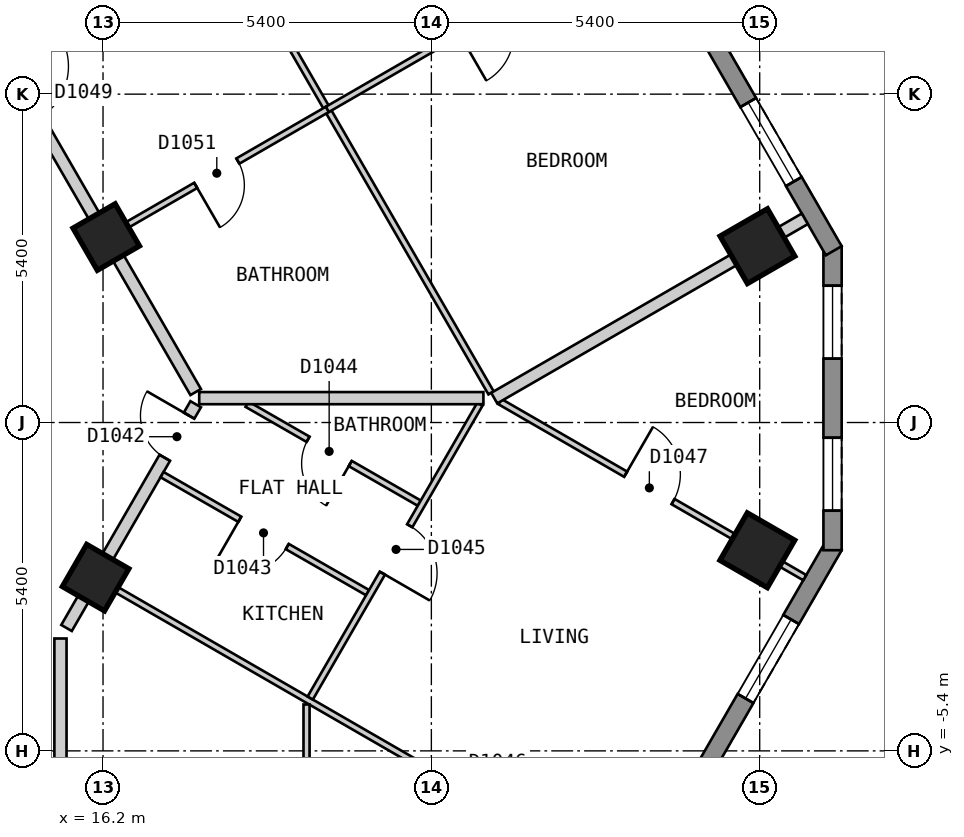
"""IFC4 building model, lengths in metres.
Left out: names, types, materials, properties, quantities, classifications, styles, units other than length and angle.
Written with IfcOpenShell. Run it as: python <this file> out.ifc"""

import sys

from ifc_helpers import new_model, si_unit, direction, frame, frame_2d, origin, origin_2d, place, context, subcontext, project, spatial, polyline, rectangle, outline, extrude, element, fill, save


model = new_model("IFC4")
c1 = context("Model", 3, precision=1e-05, world=origin(), true_north=direction((0.0, 1.0)))
c2 = subcontext(c1, "Body", "Model", "MODEL_VIEW")
j1 = project(units=[si_unit("LENGTHUNIT", "METRE"), si_unit("PLANEANGLEUNIT", "RADIAN")], contexts=[c1])
p1 = place(None, origin())
s1 = spatial("IfcSite", under=j1, at=p1, CompositionType="ELEMENT")
p2 = place(p1, origin())
s2 = spatial("IfcBuilding", under=s1, at=p2, CompositionType="ELEMENT")
p3 = place(p2, frame((0.0, 0.0, 120.6)))
s3 = spatial("IfcBuildingStorey", under=s2, at=p3, CompositionType="ELEMENT", Elevation=120.6)
for number, where, z_axis, x_axis in (
    (1, (26.961, -2.101, 0.0), (0.0, 0.0, 1.0), (0.5, 0.866, 0.0)),
    (2, (26.963, 2.9, 0.0), (0.0, 0.0, 1.0), (-0.5, 0.866, 0.0)),
):
    element("IfcColumn", number, at=place(p3, frame(where, z_axis=z_axis, x_axis=x_axis)), inside=s3, PredefinedType="COLUMN", context=c2, shape_type="SweptSolid", body=[
        extrude(rectangle(XDim=0.9, YDim=0.9, at=origin_2d()), origin(), (0.0, 0.0, 1.0), 3.0),
    ])
for number, where, z_axis, x_axis in (
    (3, (16.078, -2.551, 0.0), (0.0, 0.0, 1.0), (0.5, 0.866, 0.0)),
    (4, (16.253, 3.05, 0.0), (0.0, 0.0, 1.0), (-0.5, 0.866, 0.0)),
):
    element("IfcColumn", number, at=place(p3, frame(where, z_axis=z_axis, x_axis=x_axis)), inside=s3, PredefinedType="COLUMN", context=c2, shape_type="SweptSolid", body=[
        extrude(rectangle(XDim=0.8, YDim=0.8, at=origin_2d()), origin(), (0.0, 0.0, 1.0), 3.0),
    ])
p4 = place(p3, frame((15.862, -23.425, 0.0), z_axis=(0.0, 0.0, 1.0), x_axis=(0.500017503135, 0.866015298109, 0.0)))
e5 = element("IfcWall", 5, at=p4, inside=s3, PredefinedType="SOLIDWALL", context=c2, shape_type="SweptSolid", body=[
    extrude(outline(polyline([(0.0, -0.15), (24.711, -0.15), (24.631, 0.15), (0.08, 0.15), (0.0, -0.15)])), origin(), (0.0, 0.0, 1.0), 2.7),
])
p5 = place(p4, frame((1.4, 0.0, 0.15)))
e6 = element("IfcOpeningElement", 6, at=p5, cuts=e5, PredefinedType="OPENING", context=c2, shape_type="SweptSolid", body=[
    extrude(rectangle(XDim=1.5, YDim=2.1, at=frame_2d((0.75, 1.05))), frame((0.0, 0.16, 0.0), z_axis=(0.0, -1.0, 0.0), x_axis=(1.0, 0.0, 0.0)), (0.0, 0.0, 1.0), 0.32),
])
p6 = place(p4, frame((4.316, 0.0, 0.15)))
e7 = element("IfcOpeningElement", 7, at=p6, cuts=e5, PredefinedType="OPENING", context=c2, shape_type="SweptSolid", body=[
    extrude(rectangle(XDim=1.5, YDim=2.1, at=frame_2d((0.75, 1.05))), frame((0.0, 0.16, 0.0), z_axis=(0.0, -1.0, 0.0), x_axis=(1.0, 0.0, 0.0)), (0.0, 0.0, 1.0), 0.32),
])
p7 = place(p4, frame((7.231, 0.0, 0.15)))
e8 = element("IfcOpeningElement", 8, at=p7, cuts=e5, PredefinedType="OPENING", context=c2, shape_type="SweptSolid", body=[
    extrude(rectangle(XDim=1.5, YDim=2.1, at=frame_2d((0.75, 1.05))), frame((0.0, 0.16, 0.0), z_axis=(0.0, -1.0, 0.0), x_axis=(1.0, 0.0, 0.0)), (0.0, 0.0, 1.0), 0.32),
])
p8 = place(p4, frame((10.147, 0.0, 0.15)))
e9 = element("IfcOpeningElement", 9, at=p8, cuts=e5, PredefinedType="OPENING", context=c2, shape_type="SweptSolid", body=[
    extrude(rectangle(XDim=1.5, YDim=2.1, at=frame_2d((0.75, 1.05))), frame((0.0, 0.16, 0.0), z_axis=(0.0, -1.0, 0.0), x_axis=(1.0, 0.0, 0.0)), (0.0, 0.0, 1.0), 0.32),
])
p9 = place(p4, frame((13.062, 0.0, 0.15)))
e10 = element("IfcOpeningElement", 10, at=p9, cuts=e5, PredefinedType="OPENING", context=c2, shape_type="SweptSolid", body=[
    extrude(rectangle(XDim=1.5, YDim=2.1, at=frame_2d((0.75, 1.05))), frame((0.0, 0.16, 0.0), z_axis=(0.0, -1.0, 0.0), x_axis=(1.0, 0.0, 0.0)), (0.0, 0.0, 1.0), 0.32),
])
p10 = place(p4, frame((15.977, 0.0, 0.15)))
e11 = element("IfcOpeningElement", 11, at=p10, cuts=e5, PredefinedType="OPENING", context=c2, shape_type="SweptSolid", body=[
    extrude(rectangle(XDim=1.5, YDim=2.1, at=frame_2d((0.75, 1.05))), frame((0.0, 0.16, 0.0), z_axis=(0.0, -1.0, 0.0), x_axis=(1.0, 0.0, 0.0)), (0.0, 0.0, 1.0), 0.32),
])
p11 = place(p4, frame((18.893, 0.0, 0.15)))
e12 = element("IfcOpeningElement", 12, at=p11, cuts=e5, PredefinedType="OPENING", context=c2, shape_type="SweptSolid", body=[
    extrude(rectangle(XDim=1.5, YDim=2.1, at=frame_2d((0.75, 1.05))), frame((0.0, 0.16, 0.0), z_axis=(0.0, -1.0, 0.0), x_axis=(1.0, 0.0, 0.0)), (0.0, 0.0, 1.0), 0.32),
])
p12 = place(p4, frame((21.809, 0.0, 0.15)))
e13 = element("IfcOpeningElement", 13, at=p12, cuts=e5, PredefinedType="OPENING", context=c2, shape_type="SweptSolid", body=[
    extrude(rectangle(XDim=1.5, YDim=2.1, at=frame_2d((0.75, 1.05))), frame((0.0, 0.16, 0.0), z_axis=(0.0, -1.0, 0.0), x_axis=(1.0, 0.0, 0.0)), (0.0, 0.0, 1.0), 0.32),
])
p13 = place(p3, frame((28.198, -2.1, 0.0), z_axis=(0.0, 0.0, 1.0), x_axis=(0.0, 1.0, 0.0)))
e14 = element("IfcWall", 14, at=p13, inside=s3, PredefinedType="SOLIDWALL", context=c2, shape_type="SweptSolid", body=[
    extrude(outline(polyline([(0.0, -0.15), (5.0, -0.15), (4.92, 0.15), (0.08, 0.15), (0.0, -0.15)])), origin(), (0.0, 0.0, 1.0), 2.7),
])
p14 = place(p13, frame((0.65, 0.0, 0.15)))
e15 = element("IfcOpeningElement", 15, at=p14, cuts=e14, PredefinedType="OPENING", context=c2, shape_type="SweptSolid", body=[
    extrude(rectangle(XDim=1.2, YDim=2.1, at=frame_2d((0.6, 1.05))), frame((0.0, 0.16, 0.0), z_axis=(0.0, -1.0, 0.0), x_axis=(1.0, 0.0, 0.0)), (0.0, 0.0, 1.0), 0.32),
])
p15 = place(p13, frame((3.15, 0.0, 0.15)))
e16 = element("IfcOpeningElement", 16, at=p15, cuts=e14, PredefinedType="OPENING", context=c2, shape_type="SweptSolid", body=[
    extrude(rectangle(XDim=1.2, YDim=2.1, at=frame_2d((0.6, 1.05))), frame((0.0, 0.16, 0.0), z_axis=(0.0, -1.0, 0.0), x_axis=(1.0, 0.0, 0.0)), (0.0, 0.0, 1.0), 0.32),
])
p16 = place(p3, frame((28.218, 2.825, 0.0), z_axis=(0.0, 0.0, 1.0), x_axis=(-0.500020536353, 0.866013546791, 0.0)))
e17 = element("IfcWall", 17, at=p16, inside=s3, PredefinedType="SOLIDWALL", context=c2, shape_type="SweptSolid", body=[
    extrude(outline(polyline([(0.0, -0.15), (23.325, -0.15), (23.245, 0.15), (0.08, 0.15), (0.0, -0.15)])), origin(), (0.0, 0.0, 1.0), 2.7),
])
p17 = place(p16, frame((1.314, 0.0, 0.15)))
e18 = element("IfcOpeningElement", 18, at=p17, cuts=e17, PredefinedType="OPENING", context=c2, shape_type="SweptSolid", body=[
    extrude(rectangle(XDim=1.5, YDim=2.1, at=frame_2d((0.75, 1.05))), frame((0.0, 0.16, 0.0), z_axis=(0.0, -1.0, 0.0), x_axis=(1.0, 0.0, 0.0)), (0.0, 0.0, 1.0), 0.32),
])
p18 = place(p16, frame((4.056, 0.0, 0.15)))
e19 = element("IfcOpeningElement", 19, at=p18, cuts=e17, PredefinedType="OPENING", context=c2, shape_type="SweptSolid", body=[
    extrude(rectangle(XDim=1.5, YDim=2.1, at=frame_2d((0.75, 1.05))), frame((0.0, 0.16, 0.0), z_axis=(0.0, -1.0, 0.0), x_axis=(1.0, 0.0, 0.0)), (0.0, 0.0, 1.0), 0.32),
])
p19 = place(p16, frame((6.798, 0.0, 0.15)))
e20 = element("IfcOpeningElement", 20, at=p19, cuts=e17, PredefinedType="OPENING", context=c2, shape_type="SweptSolid", body=[
    extrude(rectangle(XDim=1.5, YDim=2.1, at=frame_2d((0.75, 1.05))), frame((0.0, 0.16, 0.0), z_axis=(0.0, -1.0, 0.0), x_axis=(1.0, 0.0, 0.0)), (0.0, 0.0, 1.0), 0.32),
])
p20 = place(p16, frame((9.541, 0.0, 0.15)))
e21 = element("IfcOpeningElement", 21, at=p20, cuts=e17, PredefinedType="OPENING", context=c2, shape_type="SweptSolid", body=[
    extrude(rectangle(XDim=1.5, YDim=2.1, at=frame_2d((0.75, 1.05))), frame((0.0, 0.16, 0.0), z_axis=(0.0, -1.0, 0.0), x_axis=(1.0, 0.0, 0.0)), (0.0, 0.0, 1.0), 0.32),
])
p21 = place(p16, frame((12.284, 0.0, 0.15)))
e22 = element("IfcOpeningElement", 22, at=p21, cuts=e17, PredefinedType="OPENING", context=c2, shape_type="SweptSolid", body=[
    extrude(rectangle(XDim=1.5, YDim=2.1, at=frame_2d((0.75, 1.05))), frame((0.0, 0.16, 0.0), z_axis=(0.0, -1.0, 0.0), x_axis=(1.0, 0.0, 0.0)), (0.0, 0.0, 1.0), 0.32),
])
p22 = place(p16, frame((15.027, 0.0, 0.15)))
e23 = element("IfcOpeningElement", 23, at=p22, cuts=e17, PredefinedType="OPENING", context=c2, shape_type="SweptSolid", body=[
    extrude(rectangle(XDim=1.5, YDim=2.1, at=frame_2d((0.75, 1.05))), frame((0.0, 0.16, 0.0), z_axis=(0.0, -1.0, 0.0), x_axis=(1.0, 0.0, 0.0)), (0.0, 0.0, 1.0), 0.32),
])
p23 = place(p16, frame((17.769, 0.0, 0.15)))
e24 = element("IfcOpeningElement", 24, at=p23, cuts=e17, PredefinedType="OPENING", context=c2, shape_type="SweptSolid", body=[
    extrude(rectangle(XDim=1.5, YDim=2.1, at=frame_2d((0.75, 1.05))), frame((0.0, 0.16, 0.0), z_axis=(0.0, -1.0, 0.0), x_axis=(1.0, 0.0, 0.0)), (0.0, 0.0, 1.0), 0.32),
])
p24 = place(p16, frame((20.511, 0.0, 0.15)))
e25 = element("IfcOpeningElement", 25, at=p24, cuts=e17, PredefinedType="OPENING", context=c2, shape_type="SweptSolid", body=[
    extrude(rectangle(XDim=1.5, YDim=2.1, at=frame_2d((0.75, 1.05))), frame((0.0, 0.16, 0.0), z_axis=(0.0, -1.0, 0.0), x_axis=(1.0, 0.0, 0.0)), (0.0, 0.0, 1.0), 0.32),
])
p25 = place(p3, frame((9.296, 15.1, 0.0), z_axis=(0.0, 0.0, 1.0), x_axis=(0.499974024244, -0.866040400375, 0.0)))
e26 = element("IfcWall", 26, at=p25, inside=s3, PredefinedType="PARTITIONING", context=c2, shape_type="SweptSolid", body=[
    extrude(rectangle(XDim=16.857, YDim=0.2, at=frame_2d((8.429, 0.0))), origin(), (0.0, 0.0, 1.0), 2.7),
])
p26 = place(p25, frame((10.672, 0.0, 0.0)))
e27 = element("IfcOpeningElement", 27, at=p26, cuts=e26, PredefinedType="OPENING", context=c2, shape_type="SweptSolid", body=[
    extrude(rectangle(XDim=1.0, YDim=2.1, at=frame_2d((0.5, 1.05))), frame((0.0, 0.11, 0.0), z_axis=(0.0, -1.0, 0.0), x_axis=(1.0, 0.0, 0.0)), (0.0, 0.0, 1.0), 0.22),
])
p27 = place(p3, frame((15.6, -3.379, 0.0), z_axis=(0.0, 0.0, 1.0), x_axis=(0.499896543382, 0.866085126252, 0.0)))
e28 = element("IfcWall", 28, at=p27, inside=s3, PredefinedType="PARTITIONING", context=c2, shape_type="SweptSolid", body=[
    extrude(rectangle(XDim=4.249, YDim=0.2, at=frame_2d((2.125, 0.0))), origin(), (0.0, 0.0, 1.0), 2.7),
])
p28 = place(p27, frame((3.232, 0.0, 0.0)))
e29 = element("IfcOpeningElement", 29, at=p28, cuts=e28, PredefinedType="OPENING", context=c2, shape_type="SweptSolid", body=[
    extrude(rectangle(XDim=0.8, YDim=2.1, at=frame_2d((0.4, 1.05))), frame((0.0, 0.11, 0.0), z_axis=(0.0, -1.0, 0.0), x_axis=(1.0, 0.0, 0.0)), (0.0, 0.0, 1.0), 0.22),
])
p29 = place(p3, frame((15.5, -21.2, 0.0), z_axis=(0.0, 0.0, 1.0), x_axis=(0.0, 1.0, 0.0)))
e30 = element("IfcWall", 30, at=p29, inside=s3, PredefinedType="PARTITIONING", context=c2, shape_type="SweptSolid", body=[
    extrude(rectangle(XDim=17.648, YDim=0.2, at=frame_2d((8.824, 0.0))), origin(), (0.0, 0.0, 1.0), 2.7),
])
p30 = place(p29, frame((7.575, 0.0, 0.0)))
e31 = element("IfcOpeningElement", 31, at=p30, cuts=e30, PredefinedType="OPENING", context=c2, shape_type="SweptSolid", body=[
    extrude(rectangle(XDim=1.0, YDim=2.1, at=frame_2d((0.5, 1.05))), frame((0.0, 0.11, 0.0), z_axis=(0.0, -1.0, 0.0), x_axis=(1.0, 0.0, 0.0)), (0.0, 0.0, 1.0), 0.22),
])
p31 = place(p3, frame((14.455, 14.563, 0.0), z_axis=(0.0, 0.0, 1.0), x_axis=(0.500009803579, -0.866019743612, 0.0)))
e32 = element("IfcWall", 32, at=p31, inside=s3, PredefinedType="PARTITIONING", context=c2, shape_type="SweptSolid", body=[
    extrude(rectangle(XDim=16.254, YDim=0.1, at=frame_2d((8.127, 0.0))), origin(), (0.0, 0.0, 1.0), 2.7),
])
p32 = place(p31, frame((7.677, 0.0, 0.0)))
e33 = element("IfcOpeningElement", 33, at=p32, cuts=e32, PredefinedType="OPENING", context=c2, shape_type="SweptSolid", body=[
    extrude(rectangle(XDim=0.9, YDim=2.1, at=frame_2d((0.45, 1.05))), frame((0.0, 0.06, 0.0), z_axis=(0.0, -1.0, 0.0), x_axis=(1.0, 0.0, 0.0)), (0.0, 0.0, 1.0), 0.12),
])
p33 = place(p3, frame((16.165, -2.601, 0.0), z_axis=(0.0, 0.0, 1.0), x_axis=(0.866016855193, -0.500014806302, 0.0)))
e34 = element("IfcWall", 34, at=p33, inside=s3, PredefinedType="PARTITIONING", context=c2, shape_type="SweptSolid", body=[
    extrude(rectangle(XDim=10.0, YDim=0.1, at=frame_2d((5.0, 0.0))), origin(), (0.0, 0.0, 1.0), 2.7),
])
p34 = place(p33, frame((6.524, 0.0, 0.0)))
e35 = element("IfcOpeningElement", 35, at=p34, cuts=e34, PredefinedType="OPENING", context=c2, shape_type="SweptSolid", body=[
    extrude(rectangle(XDim=0.9, YDim=2.1, at=frame_2d((0.45, 1.05))), frame((0.0, 0.06, 0.0), z_axis=(0.0, -1.0, 0.0), x_axis=(1.0, 0.0, 0.0)), (0.0, 0.0, 1.0), 0.12),
])
p35 = place(p3, frame((17.171, -0.857, 0.0), z_axis=(0.0, 0.0, 1.0), x_axis=(0.867173455867, -0.49800622229, 0.0)))
e36 = element("IfcWall", 36, at=p35, inside=s3, PredefinedType="PARTITIONING", context=c2, shape_type="SweptSolid", body=[
    extrude(rectangle(XDim=3.898, YDim=0.1, at=frame_2d((1.949, 0.0))), origin(), (0.0, 0.0, 1.0), 2.7),
])
p36 = place(p35, frame((1.474, 0.0, 0.0)))
e37 = element("IfcOpeningElement", 37, at=p36, cuts=e36, PredefinedType="OPENING", context=c2, shape_type="SweptSolid", body=[
    extrude(rectangle(XDim=0.9, YDim=2.1, at=frame_2d((0.45, 1.05))), frame((0.0, 0.06, 0.0), z_axis=(0.0, -1.0, 0.0), x_axis=(1.0, 0.0, 0.0)), (0.0, 0.0, 1.0), 0.12),
])
p37 = place(p3, frame((18.568, 0.301, 0.0), z_axis=(0.0, 0.0, 1.0), x_axis=(0.867155675456, -0.49803718187, 0.0)))
e38 = element("IfcWall", 38, at=p37, inside=s3, PredefinedType="PARTITIONING", context=c2, shape_type="SweptSolid", body=[
    extrude(rectangle(XDim=3.267, YDim=0.1, at=frame_2d((1.633, 0.0))), origin(), (0.0, 0.0, 1.0), 2.7),
])
p38 = place(p37, frame((1.158, 0.0, 0.0)))
e39 = element("IfcOpeningElement", 39, at=p38, cuts=e38, PredefinedType="OPENING", context=c2, shape_type="SweptSolid", body=[
    extrude(rectangle(XDim=0.8, YDim=2.1, at=frame_2d((0.4, 1.05))), frame((0.0, 0.06, 0.0), z_axis=(0.0, -1.0, 0.0), x_axis=(1.0, 0.0, 0.0)), (0.0, 0.0, 1.0), 0.12),
])
p39 = place(p3, frame((22.729, 0.343, 0.0), z_axis=(0.0, 0.0, 1.0), x_axis=(0.865996608848, -0.500049870977, 0.0)))
e40 = element("IfcWall", 40, at=p39, inside=s3, PredefinedType="PARTITIONING", context=c2, shape_type="SweptSolid", body=[
    extrude(rectangle(XDim=5.788, YDim=0.1, at=frame_2d((2.894, 0.0))), origin(), (0.0, 0.0, 1.0), 2.7),
])
p40 = place(p39, frame((2.386, 0.0, 0.0)))
e41 = element("IfcOpeningElement", 41, at=p40, cuts=e40, PredefinedType="OPENING", context=c2, shape_type="SweptSolid", body=[
    extrude(rectangle(XDim=0.9, YDim=2.1, at=frame_2d((0.45, 1.05))), frame((0.0, 0.06, 0.0), z_axis=(0.0, -1.0, 0.0), x_axis=(1.0, 0.0, 0.0)), (0.0, 0.0, 1.0), 0.12),
])
p41 = place(p3, frame((19.608, -4.531, 0.0), z_axis=(0.0, 0.0, 1.0), x_axis=(0.500035555316, 0.86600487494, 0.0)))
e42 = element("IfcWall", 42, at=p41, inside=s3, PredefinedType="PARTITIONING", context=c2, shape_type="SweptSolid", body=[
    extrude(rectangle(XDim=5.58, YDim=0.1, at=frame_2d((2.79, 0.0))), origin(), (0.0, 0.0, 1.0), 2.7),
])
p42 = place(p41, frame((2.372, 0.0, 0.0)))
e43 = element("IfcOpeningElement", 43, at=p42, cuts=e42, PredefinedType="OPENING", context=c2, shape_type="SweptSolid", body=[
    extrude(rectangle(XDim=0.9, YDim=2.1, at=frame_2d((0.45, 1.05))), frame((0.0, 0.06, 0.0), z_axis=(0.0, -1.0, 0.0), x_axis=(1.0, 0.0, 0.0)), (0.0, 0.0, 1.0), 0.12),
])
p43 = place(p3, frame((19.547, -11.171, 0.0), z_axis=(0.0, 0.0, 1.0), x_axis=(0.0, 1.0, 0.0)))
e44 = element("IfcWall", 44, at=p43, inside=s3, PredefinedType="PARTITIONING", context=c2, shape_type="SweptSolid", body=[
    extrude(rectangle(XDim=6.534, YDim=0.1, at=frame_2d((3.267, 0.0))), origin(), (0.0, 0.0, 1.0), 2.7),
])
p44 = place(p43, frame((2.81, 0.0, 0.0)))
e45 = element("IfcOpeningElement", 45, at=p44, cuts=e44, PredefinedType="OPENING", context=c2, shape_type="SweptSolid", body=[
    extrude(rectangle(XDim=0.8, YDim=2.1, at=frame_2d((0.4, 1.05))), frame((0.0, 0.06, 0.0), z_axis=(0.0, -1.0, 0.0), x_axis=(1.0, 0.0, 0.0)), (0.0, 0.0, 1.0), 0.12),
])
p45 = place(p3, frame((16.339, 3.1, 0.0), z_axis=(0.0, 0.0, 1.0), x_axis=(0.866050731258, 0.499956128963, 0.0)))
e46 = element("IfcWall", 46, at=p45, inside=s3, PredefinedType="PARTITIONING", context=c2, shape_type="SweptSolid", body=[
    extrude(rectangle(XDim=4.1, YDim=0.1, at=frame_2d((2.05, 0.0))), origin(), (0.0, 0.0, 1.0), 2.7),
])
p46 = place(p45, frame((1.6, 0.0, 0.0)))
e47 = element("IfcOpeningElement", 47, at=p46, cuts=e46, PredefinedType="OPENING", context=c2, shape_type="SweptSolid", body=[
    extrude(rectangle(XDim=0.8, YDim=2.1, at=frame_2d((0.4, 1.05))), frame((0.0, 0.06, 0.0), z_axis=(0.0, -1.0, 0.0), x_axis=(1.0, 0.0, 0.0)), (0.0, 0.0, 1.0), 0.12),
])
p47 = place(p3, frame((17.782, 0.401, 0.0), z_axis=(0.0, 0.0, 1.0), x_axis=(1.0, 0.0, 0.0)))
e48 = element("IfcWall", 48, at=p47, inside=s3, PredefinedType="PARTITIONING", context=c2, shape_type="SweptSolid", body=[
    extrude(rectangle(XDim=4.674, YDim=0.2, at=frame_2d((2.337, 0.0))), origin(), (0.0, 0.0, 1.0), 2.7),
])
p48 = place(p3, frame((22.634, 0.401, 0.0), z_axis=(0.0, 0.0, 1.0), x_axis=(0.86601325737, 0.500021037617, 0.0)))
e49 = element("IfcWall", 49, at=p48, inside=s3, PredefinedType="PARTITIONING", context=c2, shape_type="SweptSolid", body=[
    extrude(rectangle(XDim=5.898, YDim=0.2, at=frame_2d((2.949, 0.0))), origin(), (0.0, 0.0, 1.0), 2.7),
])
p49 = place(p3, frame((19.89, 5.15, 0.0), z_axis=(0.0, 0.0, 1.0), x_axis=(0.865993310977, 0.500055582255, 0.0)))
e50 = element("IfcWall", 50, at=p49, inside=s3, PredefinedType="PARTITIONING", context=c2, shape_type="SweptSolid", body=[
    extrude(rectangle(XDim=5.9, YDim=0.1, at=frame_2d((2.95, 0.0))), origin(), (0.0, 0.0, 1.0), 2.7),
])
p50 = place(p49, frame((2.5, 0.0, 0.0)))
e51 = element("IfcOpeningElement", 51, at=p50, cuts=e50, PredefinedType="OPENING", context=c2, shape_type="SweptSolid", body=[
    extrude(rectangle(XDim=0.9, YDim=2.1, at=frame_2d((0.45, 1.05))), frame((0.0, 0.06, 0.0), z_axis=(0.0, -1.0, 0.0), x_axis=(1.0, 0.0, 0.0)), (0.0, 0.0, 1.0), 0.12),
])
p51 = place(p12, origin())
e52 = element("IfcWindow", 52, at=p51, inside=s3, PartitioningType="SINGLE_PANEL", PredefinedType="WINDOW", context=c2, shape_type="SweptSolid", body=[
    extrude(rectangle(XDim=1.5, YDim=2.1, at=frame_2d((0.75, 1.05))), frame((0.0, 0.03, 0.0), z_axis=(0.0, -1.0, 0.0), x_axis=(1.0, 0.0, 0.0)), (0.0, 0.0, 1.0), 0.06),
])
fill(e13, e52)
p52 = place(p14, origin())
e53 = element("IfcWindow", 53, at=p52, inside=s3, PartitioningType="SINGLE_PANEL", PredefinedType="WINDOW", context=c2, shape_type="SweptSolid", body=[
    extrude(rectangle(XDim=1.2, YDim=2.1, at=frame_2d((0.6, 1.05))), frame((0.0, 0.03, 0.0), z_axis=(0.0, -1.0, 0.0), x_axis=(1.0, 0.0, 0.0)), (0.0, 0.0, 1.0), 0.06),
])
fill(e15, e53)
p53 = place(p15, origin())
e54 = element("IfcWindow", 54, at=p53, inside=s3, PartitioningType="SINGLE_PANEL", PredefinedType="WINDOW", context=c2, shape_type="SweptSolid", body=[
    extrude(rectangle(XDim=1.2, YDim=2.1, at=frame_2d((0.6, 1.05))), frame((0.0, 0.03, 0.0), z_axis=(0.0, -1.0, 0.0), x_axis=(1.0, 0.0, 0.0)), (0.0, 0.0, 1.0), 0.06),
])
fill(e16, e54)
p54 = place(p17, origin())
e55 = element("IfcWindow", 55, at=p54, inside=s3, PartitioningType="SINGLE_PANEL", PredefinedType="WINDOW", context=c2, shape_type="SweptSolid", body=[
    extrude(rectangle(XDim=1.5, YDim=2.1, at=frame_2d((0.75, 1.05))), frame((0.0, 0.03, 0.0), z_axis=(0.0, -1.0, 0.0), x_axis=(1.0, 0.0, 0.0)), (0.0, 0.0, 1.0), 0.06),
])
fill(e18, e55)
p55 = place(p28, origin())
e56 = element("IfcDoor", 56, at=p55, inside=s3, OperationType="SINGLE_SWING_RIGHT", PredefinedType="DOOR", context=c2, shape_type="SweptSolid", body=[
    extrude(rectangle(XDim=0.8, YDim=2.1, at=frame_2d((0.4, 1.05))), frame((0.0, 0.025, 0.0), z_axis=(0.0, -1.0, 0.0), x_axis=(1.0, 0.0, 0.0)), (0.0, 0.0, 1.0), 0.05),
])
fill(e29, e56)
p56 = place(p36, origin())
e57 = element("IfcDoor", 57, at=p56, inside=s3, OperationType="SINGLE_SWING_LEFT", PredefinedType="DOOR", context=c2, shape_type="SweptSolid", body=[
    extrude(rectangle(XDim=0.9, YDim=2.1, at=frame_2d((0.45, 1.05))), frame((0.0, 0.025, 0.0), z_axis=(0.0, -1.0, 0.0), x_axis=(1.0, 0.0, 0.0)), (0.0, 0.0, 1.0), 0.05),
])
fill(e37, e57)
p57 = place(p38, origin())
e58 = element("IfcDoor", 58, at=p57, inside=s3, OperationType="SINGLE_SWING_RIGHT", PredefinedType="DOOR", context=c2, shape_type="SweptSolid", body=[
    extrude(rectangle(XDim=0.8, YDim=2.1, at=frame_2d((0.4, 1.05))), frame((0.0, 0.025, 0.0), z_axis=(0.0, -1.0, 0.0), x_axis=(1.0, 0.0, 0.0)), (0.0, 0.0, 1.0), 0.05),
])
fill(e39, e58)
p58 = place(p42, origin())
e59 = element("IfcDoor", 59, at=p58, inside=s3, OperationType="SINGLE_SWING_LEFT", PredefinedType="DOOR", context=c2, shape_type="SweptSolid", body=[
    extrude(rectangle(XDim=0.9, YDim=2.1, at=frame_2d((0.45, 1.05))), frame((0.0, 0.025, 0.0), z_axis=(0.0, -1.0, 0.0), x_axis=(1.0, 0.0, 0.0)), (0.0, 0.0, 1.0), 0.05),
])
fill(e43, e59)
p59 = place(p40, origin())
e60 = element("IfcDoor", 60, at=p59, inside=s3, OperationType="SINGLE_SWING_LEFT", PredefinedType="DOOR", context=c2, shape_type="SweptSolid", body=[
    extrude(rectangle(XDim=0.9, YDim=2.1, at=frame_2d((0.45, 1.05))), frame((0.0, 0.025, 0.0), z_axis=(0.0, -1.0, 0.0), x_axis=(1.0, 0.0, 0.0)), (0.0, 0.0, 1.0), 0.05),
])
fill(e41, e60)
p60 = place(p46, origin())
e61 = element("IfcDoor", 61, at=p60, inside=s3, OperationType="SINGLE_SWING_LEFT", PredefinedType="DOOR", context=c2, shape_type="SweptSolid", body=[
    extrude(rectangle(XDim=0.8, YDim=2.1, at=frame_2d((0.4, 1.05))), frame((0.0, 0.025, 0.0), z_axis=(0.0, -1.0, 0.0), x_axis=(1.0, 0.0, 0.0)), (0.0, 0.0, 1.0), 0.05),
])
fill(e47, e61)
save(model, sys.argv[1])
